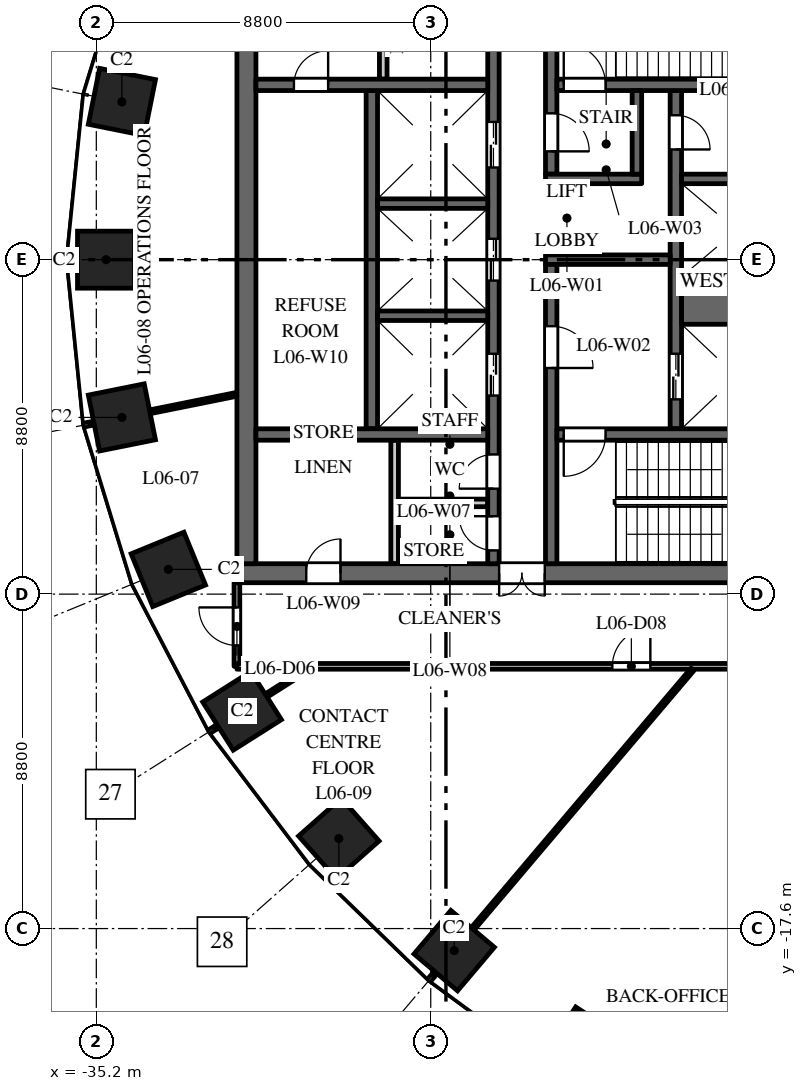
"""IFC4 building model, lengths in metres.
Left out: names, types, materials, properties, quantities, classifications, styles, units other than length and angle.
Written with IfcOpenShell. Run it as: python <this file> out.ifc"""

import sys

from ifc_helpers import new_model, si_unit, direction, frame, frame_2d, origin, origin_2d, place, context, subcontext, project, spatial, rectangle, extrude, element, fill, save


model = new_model("IFC4")
c1 = context("Model", 3, precision=1e-05, world=origin(), true_north=direction((0.0, 1.0)))
c2 = subcontext(c1, "Body", "Model", "MODEL_VIEW")
j1 = project(units=[si_unit("LENGTHUNIT", "METRE"), si_unit("PLANEANGLEUNIT", "RADIAN")], contexts=[c1])
p1 = place(None, origin())
s1 = spatial("IfcSite", under=j1, at=p1, CompositionType="ELEMENT")
p2 = place(p1, origin())
s2 = spatial("IfcBuilding", under=s1, at=p2, CompositionType="ELEMENT")
p3 = place(p2, frame((0.0, 0.0, 34.5)))
s3 = spatial("IfcBuildingStorey", under=s2, at=p3, CompositionType="ELEMENT", Elevation=34.5)
for number, where, z_axis, x_axis in (
    (1, (-34.527, 4.151, 0.0), (0.0, 0.0, 1.0), (-0.197, -0.98, 0.0)),
    (2, (-34.945, 0.0, 0.0), (0.0, 0.0, 1.0), (0.0, -1.0, 0.0)),
    (3, (-34.527, -4.151, 0.0), (0.0, 0.0, 1.0), (0.197, -0.98, 0.0)),
    (4, (-33.305, -8.149, 0.0), (0.0, 0.0, 1.0), (0.379, -0.925, 0.0)),
    (5, (-31.365, -11.871, 0.0), (0.0, 0.0, 1.0), (0.535, -0.845, 0.0)),
    (6, (-28.819, -15.23, 0.0), (0.0, 0.0, 1.0), (0.663, -0.749, 0.0)),
    (7, (-25.783, -18.18, 0.0), (0.0, 0.0, 1.0), (0.763, -0.646, 0.0)),
    (8, (-22.362, -20.7, 0.0), (0.0, 0.0, 1.0), (0.84, -0.542, 0.0)),
):
    element("IfcColumn", number, at=place(p3, frame(where, z_axis=z_axis, x_axis=x_axis)), inside=s3, PredefinedType="COLUMN", context=c2, shape_type="SweptSolid", body=[
        extrude(rectangle(XDim=1.5, YDim=1.5, at=origin_2d()), origin(), (0.0, 0.0, 1.0), 4.0),
    ])
p4 = place(p3, frame((-16.5, -8.25, 0.0), z_axis=(0.0, 0.0, 1.0), x_axis=(-1.0, 0.0, 0.0)))
e9 = element("IfcWall", 9, at=p4, inside=s3, PredefinedType="SHEAR", context=c2, shape_type="SweptSolid", body=[
    extrude(rectangle(XDim=15.0, YDim=0.5, at=frame_2d((7.5, 0.0))), origin(), (0.0, 0.0, 1.0), 3.7),
])
p5 = place(p4, frame((6.9, 0.0, 0.0)))
e10 = element("IfcOpeningElement", 10, at=p5, cuts=e9, PredefinedType="OPENING", context=c2, shape_type="SweptSolid", body=[
    extrude(rectangle(XDim=1.2, YDim=2.1, at=frame_2d((0.6, 1.05))), frame((0.0, 0.26, 0.0), z_axis=(0.0, -1.0, 0.0), x_axis=(1.0, 0.0, 0.0)), (0.0, 0.0, 1.0), 0.52),
])
p6 = place(p4, frame((12.275, 0.0, 0.0)))
e11 = element("IfcOpeningElement", 11, at=p6, cuts=e9, PredefinedType="OPENING", context=c2, shape_type="SweptSolid", body=[
    extrude(rectangle(XDim=0.9, YDim=2.1, at=frame_2d((0.45, 1.05))), frame((0.0, 0.26, 0.0), z_axis=(0.0, -1.0, 0.0), x_axis=(1.0, 0.0, 0.0)), (0.0, 0.0, 1.0), 0.52),
])
p7 = place(p3, frame((-27.95, -4.45, 0.0), z_axis=(0.0, 0.0, 1.0), x_axis=(0.0, 1.0, 0.0)))
e12 = element("IfcWall", 12, at=p7, inside=s3, PredefinedType="SHEAR", context=c2, shape_type="SweptSolid", body=[
    extrude(rectangle(XDim=8.9, YDim=0.3, at=frame_2d((4.45, 0.0))), origin(), (0.0, 0.0, 1.0), 3.7),
])
p8 = place(p3, frame((-19.95, -4.45, 0.0), z_axis=(0.0, 0.0, 1.0), x_axis=(0.0, 1.0, 0.0)))
e13 = element("IfcWall", 13, at=p8, inside=s3, PredefinedType="SHEAR", context=c2, shape_type="SweptSolid", body=[
    extrude(rectangle(XDim=8.9, YDim=0.3, at=frame_2d((4.45, 0.0))), origin(), (0.0, 0.0, 1.0), 3.7),
])
p9 = place(p8, frame((0.775, 0.0, 0.0)))
e14 = element("IfcOpeningElement", 14, at=p9, cuts=e13, PredefinedType="OPENING", context=c2, shape_type="SweptSolid", body=[
    extrude(rectangle(XDim=1.2, YDim=2.1, at=frame_2d((0.6, 1.05))), frame((0.0, 0.16, 0.0), z_axis=(0.0, -1.0, 0.0), x_axis=(1.0, 0.0, 0.0)), (0.0, 0.0, 1.0), 0.32),
])
p10 = place(p8, frame((7.35, 0.0, 0.0)))
e15 = element("IfcOpeningElement", 15, at=p10, cuts=e13, PredefinedType="OPENING", context=c2, shape_type="SweptSolid", body=[
    extrude(rectangle(XDim=0.9, YDim=2.1, at=frame_2d((0.45, 1.05))), frame((0.0, 0.16, 0.0), z_axis=(0.0, -1.0, 0.0), x_axis=(1.0, 0.0, 0.0)), (0.0, 0.0, 1.0), 0.32),
])
p11 = place(p3, frame((-24.75, -8.0, 0.0), z_axis=(0.0, 0.0, 1.0), x_axis=(0.0, 1.0, 0.0)))
e16 = element("IfcWall", 16, at=p11, inside=s3, PredefinedType="SHEAR", context=c2, shape_type="SweptSolid", body=[
    extrude(rectangle(XDim=16.0, YDim=0.3, at=frame_2d((8.0, 0.0))), origin(), (0.0, 0.0, 1.0), 3.7),
])
p12 = place(p11, frame((4.425, 0.0, 0.0)))
e17 = element("IfcOpeningElement", 17, at=p12, cuts=e16, PredefinedType="OPENING", context=c2, shape_type="SweptSolid", body=[
    extrude(rectangle(XDim=1.1, YDim=2.1, at=frame_2d((0.55, 1.05))), frame((0.0, 0.16, 0.0), z_axis=(0.0, -1.0, 0.0), x_axis=(1.0, 0.0, 0.0)), (0.0, 0.0, 1.0), 0.32),
])
p13 = place(p11, frame((7.45, 0.0, 0.0)))
e18 = element("IfcOpeningElement", 18, at=p13, cuts=e16, PredefinedType="OPENING", context=c2, shape_type="SweptSolid", body=[
    extrude(rectangle(XDim=1.1, YDim=2.1, at=frame_2d((0.55, 1.05))), frame((0.0, 0.16, 0.0), z_axis=(0.0, -1.0, 0.0), x_axis=(1.0, 0.0, 0.0)), (0.0, 0.0, 1.0), 0.32),
])
p14 = place(p11, frame((10.425, 0.0, 0.0)))
e19 = element("IfcOpeningElement", 19, at=p14, cuts=e16, PredefinedType="OPENING", context=c2, shape_type="SweptSolid", body=[
    extrude(rectangle(XDim=1.2, YDim=2.1, at=frame_2d((0.6, 1.05))), frame((0.0, 0.16, 0.0), z_axis=(0.0, -1.0, 0.0), x_axis=(1.0, 0.0, 0.0)), (0.0, 0.0, 1.0), 0.32),
])
p15 = place(p11, frame((13.75, 0.0, 0.0)))
e20 = element("IfcOpeningElement", 20, at=p15, cuts=e16, PredefinedType="OPENING", context=c2, shape_type="SweptSolid", body=[
    extrude(rectangle(XDim=0.9, YDim=2.1, at=frame_2d((0.45, 1.05))), frame((0.0, 0.16, 0.0), z_axis=(0.0, -1.0, 0.0), x_axis=(1.0, 0.0, 0.0)), (0.0, 0.0, 1.0), 0.32),
])
p16 = place(p11, frame((1.975, 0.0, 0.0)))
e21 = element("IfcOpeningElement", 21, at=p16, cuts=e16, PredefinedType="OPENING", context=c2, shape_type="SweptSolid", body=[
    extrude(rectangle(XDim=0.9, YDim=2.1, at=frame_2d((0.45, 1.05))), frame((0.0, 0.16, 0.0), z_axis=(0.0, -1.0, 0.0), x_axis=(1.0, 0.0, 0.0)), (0.0, 0.0, 1.0), 0.32),
])
p17 = place(p11, frame((0.35, 0.0, 0.0)))
e22 = element("IfcOpeningElement", 22, at=p17, cuts=e16, PredefinedType="OPENING", context=c2, shape_type="SweptSolid", body=[
    extrude(rectangle(XDim=0.9, YDim=2.1, at=frame_2d((0.45, 1.05))), frame((0.0, 0.16, 0.0), z_axis=(0.0, -1.0, 0.0), x_axis=(1.0, 0.0, 0.0)), (0.0, 0.0, 1.0), 0.32),
])
p18 = place(p3, frame((-20.1, 0.0, 0.0), z_axis=(0.0, 0.0, 1.0), x_axis=(-1.0, 0.0, 0.0)))
e23 = element("IfcWall", 23, at=p18, inside=s3, PredefinedType="SHEAR", context=c2, shape_type="SweptSolid", body=[
    extrude(rectangle(XDim=3.28, YDim=0.25, at=frame_2d((1.64, 0.0))), origin(), (0.0, 0.0, 1.0), 3.7),
])
p19 = place(p3, frame((-31.25, -8.0, 0.0), z_axis=(0.0, 0.0, 1.0), x_axis=(0.0, 1.0, 0.0)))
e24 = element("IfcWall", 24, at=p19, inside=s3, PredefinedType="SHEAR", context=c2, shape_type="SweptSolid", body=[
    extrude(rectangle(XDim=16.0, YDim=0.5, at=frame_2d((8.0, 0.0))), origin(), (0.0, 0.0, 1.0), 3.7),
])
p20 = place(p3, frame((-24.9, 4.6, 0.0), z_axis=(0.0, 0.0, 1.0), x_axis=(-1.0, 0.0, 0.0)))
e25 = element("IfcWall", 25, at=p20, inside=s3, PredefinedType="SHEAR", context=c2, shape_type="SweptSolid", body=[
    extrude(rectangle(XDim=6.1, YDim=0.3, at=frame_2d((3.05, 0.0))), origin(), (0.0, 0.0, 1.0), 3.7),
])
p21 = place(p20, frame((4.2, 0.0, 0.0)))
e26 = element("IfcOpeningElement", 26, at=p21, cuts=e25, PredefinedType="OPENING", context=c2, shape_type="SweptSolid", body=[
    extrude(rectangle(XDim=0.9, YDim=2.1, at=frame_2d((0.45, 1.05))), frame((0.0, 0.16, 0.0), z_axis=(0.0, -1.0, 0.0), x_axis=(1.0, 0.0, 0.0)), (0.0, 0.0, 1.0), 0.32),
])
for number, where, z_axis, x_axis in (
    (27, (-27.65, 4.75, 0.0), (0.0, 0.0, 1.0), (0.0, 1.0, 0.0)),
    (28, (-27.35, -8.0, 0.0), (0.0, 0.0, 1.0), (0.0, 1.0, 0.0)),
):
    element("IfcWall", number, at=place(p3, frame(where, z_axis=z_axis, x_axis=x_axis)), inside=s3, PredefinedType="PARTITIONING", context=c2, shape_type="SweptSolid", body=[
        extrude(rectangle(XDim=3.25, YDim=0.2, at=frame_2d((1.625, 0.0))), origin(), (0.0, 0.0, 1.0), 3.7),
    ])
p22 = place(p3, frame((-24.9, -6.4, 0.0), z_axis=(0.0, 0.0, 1.0), x_axis=(-1.0, 0.0, 0.0)))
e29 = element("IfcWall", 29, at=p22, inside=s3, PredefinedType="PARTITIONING", context=c2, shape_type="SweptSolid", body=[
    extrude(rectangle(XDim=2.35, YDim=0.2, at=frame_2d((1.175, 0.0))), origin(), (0.0, 0.0, 1.0), 3.7),
])
p23 = place(p3, frame((-24.9, -4.6, 0.0), z_axis=(0.0, 0.0, 1.0), x_axis=(-1.0, 0.0, 0.0)))
e30 = element("IfcWall", 30, at=p23, inside=s3, PredefinedType="SHEAR", context=c2, shape_type="SweptSolid", body=[
    extrude(rectangle(XDim=6.1, YDim=0.3, at=frame_2d((3.05, 0.0))), origin(), (0.0, 0.0, 1.0), 3.7),
])
p24 = place(p3, frame((-16.9, -1.075, 0.0), z_axis=(0.0, 0.0, 1.0), x_axis=(-1.0, 0.0, 0.0)))
e31 = element("IfcWall", 31, at=p24, inside=s3, PredefinedType="SHEAR", context=c2, shape_type="SweptSolid", body=[
    extrude(rectangle(XDim=2.9, YDim=1.25, at=frame_2d((1.45, 0.0))), origin(), (0.0, 0.0, 1.0), 3.7),
])
for number, where, z_axis, x_axis in (
    (32, (-16.9, 2.125, 0.0), (0.0, 0.0, 1.0), (-1.0, 0.0, 0.0)),
    (33, (-24.9, -1.475, 0.0), (0.0, 0.0, 1.0), (-1.0, 0.0, 0.0)),
    (34, (-24.9, 1.475, 0.0), (0.0, 0.0, 1.0), (-1.0, 0.0, 0.0)),
):
    element("IfcWall", number, at=place(p3, frame(where, z_axis=z_axis, x_axis=x_axis)), inside=s3, PredefinedType="SHEAR", context=c2, shape_type="SweptSolid", body=[
        extrude(rectangle(XDim=2.9, YDim=0.25, at=frame_2d((1.45, 0.0))), origin(), (0.0, 0.0, 1.0), 3.7),
    ])
p25 = place(p3, frame((-23.23, 2.25, 0.0), z_axis=(0.0, 0.0, 1.0), x_axis=(0.0, 1.0, 0.0)))
e35 = element("IfcWall", 35, at=p25, inside=s3, PredefinedType="SHEAR", context=c2, shape_type="SweptSolid", body=[
    extrude(rectangle(XDim=5.75, YDim=0.3, at=frame_2d((2.875, 0.0))), origin(), (0.0, 0.0, 1.0), 3.7),
])
p26 = place(p25, frame((0.6, 0.0, 0.0)))
e36 = element("IfcOpeningElement", 36, at=p26, cuts=e35, PredefinedType="OPENING", context=c2, shape_type="SweptSolid", body=[
    extrude(rectangle(XDim=1.0, YDim=2.1, at=frame_2d((0.5, 1.05))), frame((0.0, 0.16, 0.0), z_axis=(0.0, -1.0, 0.0), x_axis=(1.0, 0.0, 0.0)), (0.0, 0.0, 1.0), 0.32),
])
p27 = place(p3, frame((-23.23, -8.0, 0.0), z_axis=(0.0, 0.0, 1.0), x_axis=(0.0, 1.0, 0.0)))
e37 = element("IfcWall", 37, at=p27, inside=s3, PredefinedType="SHEAR", context=c2, shape_type="SweptSolid", body=[
    extrude(rectangle(XDim=7.875, YDim=0.3, at=frame_2d((3.938, 0.0))), origin(), (0.0, 0.0, 1.0), 3.7),
])
p28 = place(p27, frame((5.15, 0.0, 0.0)))
e38 = element("IfcOpeningElement", 38, at=p28, cuts=e37, PredefinedType="OPENING", context=c2, shape_type="SweptSolid", body=[
    extrude(rectangle(XDim=1.1, YDim=2.1, at=frame_2d((0.55, 1.05))), frame((0.0, 0.16, 0.0), z_axis=(0.0, -1.0, 0.0), x_axis=(1.0, 0.0, 0.0)), (0.0, 0.0, 1.0), 0.32),
])
p29 = place(p3, frame((-16.9, 4.6, 0.0), z_axis=(0.0, 0.0, 1.0), x_axis=(-1.0, 0.0, 0.0)))
e39 = element("IfcWall", 39, at=p29, inside=s3, PredefinedType="SHEAR", context=c2, shape_type="SweptSolid", body=[
    extrude(rectangle(XDim=6.18, YDim=0.3, at=frame_2d((3.09, 0.0))), origin(), (0.0, 0.0, 1.0), 3.7),
])
p30 = place(p29, frame((4.9, 0.0, 0.0)))
e40 = element("IfcOpeningElement", 40, at=p30, cuts=e39, PredefinedType="OPENING", context=c2, shape_type="SweptSolid", body=[
    extrude(rectangle(XDim=1.1, YDim=2.1, at=frame_2d((0.55, 1.05))), frame((0.0, 0.16, 0.0), z_axis=(0.0, -1.0, 0.0), x_axis=(1.0, 0.0, 0.0)), (0.0, 0.0, 1.0), 0.32),
])
p31 = place(p3, frame((-16.9, -4.6, 0.0), z_axis=(0.0, 0.0, 1.0), x_axis=(-1.0, 0.0, 0.0)))
e41 = element("IfcWall", 41, at=p31, inside=s3, PredefinedType="SHEAR", context=c2, shape_type="SweptSolid", body=[
    extrude(rectangle(XDim=6.18, YDim=0.3, at=frame_2d((3.09, 0.0))), origin(), (0.0, 0.0, 1.0), 3.7),
])
p32 = place(p31, frame((4.9, 0.0, 0.0)))
e42 = element("IfcOpeningElement", 42, at=p32, cuts=e41, PredefinedType="OPENING", context=c2, shape_type="SweptSolid", body=[
    extrude(rectangle(XDim=1.1, YDim=2.1, at=frame_2d((0.55, 1.05))), frame((0.0, 0.16, 0.0), z_axis=(0.0, -1.0, 0.0), x_axis=(1.0, 0.0, 0.0)), (0.0, 0.0, 1.0), 0.32),
])
p33 = place(p3, frame((-20.85, 2.125, 0.0), z_axis=(0.0, 0.0, 1.0), x_axis=(-1.0, 0.0, 0.0)))
e43 = element("IfcWall", 43, at=p33, inside=s3, PredefinedType="SHEAR", context=c2, shape_type="SweptSolid", body=[
    extrude(rectangle(XDim=2.53, YDim=0.25, at=frame_2d((1.265, 0.0))), origin(), (0.0, 0.0, 1.0), 3.7),
])
p34 = place(p3, frame((-20.975, 2.25, 0.0), z_axis=(0.0, 0.0, 1.0), x_axis=(0.0, 1.0, 0.0)))
e44 = element("IfcWall", 44, at=p34, inside=s3, PredefinedType="SHEAR", context=c2, shape_type="SweptSolid", body=[
    extrude(rectangle(XDim=2.2, YDim=0.25, at=frame_2d((1.1, 0.0))), origin(), (0.0, 0.0, 1.0), 3.7),
])
p35 = place(p3, frame((-35.512, -4.349, 0.0), z_axis=(0.0, 0.0, 1.0), x_axis=(0.980357474535, 0.197228857227, 0.0)))
e45 = element("IfcWall", 45, at=p35, inside=s3, PredefinedType="PARTITIONING", context=c2, shape_type="SweptSolid", body=[
    extrude(rectangle(XDim=4.092, YDim=0.1, at=frame_2d((2.046, 0.0))), origin(), (0.0, 0.0, 1.0), 3.2),
])
p36 = place(p3, frame((-32.212, -12.408, 0.0), z_axis=(0.0, 0.0, 1.0), x_axis=(0.844810627195, 0.535065420467, 0.0)))
e46 = element("IfcWall", 46, at=p36, inside=s3, PredefinedType="PARTITIONING", context=c2, shape_type="SweptSolid", body=[
    extrude(rectangle(XDim=3.048, YDim=0.1, at=frame_2d((1.524, 0.0))), origin(), (0.0, 0.0, 1.0), 3.7),
])
p37 = place(p3, frame((-31.5, -10.7, 0.0), z_axis=(0.0, 0.0, 1.0), x_axis=(0.0, 1.0, 0.0)))
e47 = element("IfcWall", 47, at=p37, inside=s3, PredefinedType="PARTITIONING", context=c2, shape_type="SweptSolid", body=[
    extrude(rectangle(XDim=2.2, YDim=0.15, at=frame_2d((1.1, 0.0))), origin(), (0.0, 0.0, 1.0), 3.7),
])
p38 = place(p37, frame((0.55, 0.0, 0.0)))
e48 = element("IfcOpeningElement", 48, at=p38, cuts=e47, PredefinedType="OPENING", context=c2, shape_type="SweptSolid", body=[
    extrude(rectangle(XDim=1.0, YDim=2.1, at=frame_2d((0.5, 1.05))), frame((0.0, 0.085, 0.0), z_axis=(0.0, -1.0, 0.0), x_axis=(1.0, 0.0, 0.0)), (0.0, 0.0, 1.0), 0.17),
])
p39 = place(p3, frame((-31.5, -10.7, 0.0), z_axis=(0.0, 0.0, 1.0), x_axis=(1.0, 0.0, 0.0)))
e49 = element("IfcWall", 49, at=p39, inside=s3, PredefinedType="PARTITIONING", context=c2, shape_type="SweptSolid", body=[
    extrude(rectangle(XDim=15.0, YDim=0.15, at=frame_2d((7.5, 0.0))), origin(), (0.0, 0.0, 1.0), 3.1),
])
p40 = place(p39, frame((9.879, 0.0, 0.0)))
e50 = element("IfcOpeningElement", 50, at=p40, cuts=e49, PredefinedType="OPENING", context=c2, shape_type="SweptSolid", body=[
    extrude(rectangle(XDim=1.0, YDim=2.1, at=frame_2d((0.5, 1.05))), frame((0.0, 0.085, 0.0), z_axis=(0.0, -1.0, 0.0), x_axis=(1.0, 0.0, 0.0)), (0.0, 0.0, 1.0), 0.17),
])
p41 = place(p39, frame((13.449, 0.0, 0.0)))
e51 = element("IfcOpeningElement", 51, at=p41, cuts=e49, PredefinedType="OPENING", context=c2, shape_type="SweptSolid", body=[
    extrude(rectangle(XDim=1.0, YDim=2.1, at=frame_2d((0.5, 1.05))), frame((0.0, 0.085, 0.0), z_axis=(0.0, -1.0, 0.0), x_axis=(1.0, 0.0, 0.0)), (0.0, 0.0, 1.0), 0.17),
])
p42 = place(p3, frame((-26.43, -18.945, 0.0), z_axis=(0.0, 0.0, 1.0), x_axis=(0.646400187952, 0.762998556365, 0.0)))
e52 = element("IfcWall", 52, at=p42, inside=s3, PredefinedType="PARTITIONING", context=c2, shape_type="SweptSolid", body=[
    extrude(rectangle(XDim=10.704, YDim=0.1, at=frame_2d((5.352, 0.0))), origin(), (0.0, 0.0, 1.0), 3.7),
])
p43 = place(p3, frame((-19.086, -23.685, 0.0), z_axis=(0.0, 0.0, 1.0), x_axis=(0.439199750603, 0.898389436197, 0.0)))
e53 = element("IfcWall", 53, at=p43, inside=s3, PredefinedType="PARTITIONING", context=c2, shape_type="SweptSolid", body=[
    extrude(rectangle(XDim=11.81, YDim=0.1, at=frame_2d((5.905, 0.0))), origin(), (0.0, 0.0, 1.0), 3.7),
])
p44 = place(p9, origin())
e54 = element("IfcDoor", 54, at=p44, inside=s3, OperationType="DOUBLE_DOOR_SLIDING", PredefinedType="DOOR", context=c2, shape_type="SweptSolid", body=[
    extrude(rectangle(XDim=1.2, YDim=2.1, at=frame_2d((0.6, 1.05))), frame((0.0, 0.025, 0.0), z_axis=(0.0, -1.0, 0.0), x_axis=(1.0, 0.0, 0.0)), (0.0, 0.0, 1.0), 0.05),
])
fill(e14, e54)
p45 = place(p12, origin())
e55 = element("IfcDoor", 55, at=p45, inside=s3, OperationType="DOUBLE_DOOR_SLIDING", PredefinedType="DOOR", context=c2, shape_type="SweptSolid", body=[
    extrude(rectangle(XDim=1.1, YDim=2.1, at=frame_2d((0.55, 1.05))), frame((0.0, 0.025, 0.0), z_axis=(0.0, -1.0, 0.0), x_axis=(1.0, 0.0, 0.0)), (0.0, 0.0, 1.0), 0.05),
])
fill(e17, e55)
p46 = place(p13, origin())
e56 = element("IfcDoor", 56, at=p46, inside=s3, OperationType="DOUBLE_DOOR_SLIDING", PredefinedType="DOOR", context=c2, shape_type="SweptSolid", body=[
    extrude(rectangle(XDim=1.1, YDim=2.1, at=frame_2d((0.55, 1.05))), frame((0.0, 0.025, 0.0), z_axis=(0.0, -1.0, 0.0), x_axis=(1.0, 0.0, 0.0)), (0.0, 0.0, 1.0), 0.05),
])
fill(e18, e56)
p47 = place(p14, origin())
e57 = element("IfcDoor", 57, at=p47, inside=s3, OperationType="DOUBLE_DOOR_SLIDING", PredefinedType="DOOR", context=c2, shape_type="SweptSolid", body=[
    extrude(rectangle(XDim=1.2, YDim=2.1, at=frame_2d((0.6, 1.05))), frame((0.0, 0.025, 0.0), z_axis=(0.0, -1.0, 0.0), x_axis=(1.0, 0.0, 0.0)), (0.0, 0.0, 1.0), 0.05),
])
fill(e19, e57)
p48 = place(p30, origin())
e58 = element("IfcDoor", 58, at=p48, inside=s3, OperationType="SINGLE_SWING_RIGHT", PredefinedType="DOOR", context=c2, shape_type="SweptSolid", body=[
    extrude(rectangle(XDim=1.1, YDim=2.1, at=frame_2d((0.55, 1.05))), frame((0.0, 0.025, 0.0), z_axis=(0.0, -1.0, 0.0), x_axis=(1.0, 0.0, 0.0)), (0.0, 0.0, 1.0), 0.05),
])
fill(e40, e58)
p49 = place(p32, origin())
e59 = element("IfcDoor", 59, at=p49, inside=s3, OperationType="SINGLE_SWING_LEFT", PredefinedType="DOOR", context=c2, shape_type="SweptSolid", body=[
    extrude(rectangle(XDim=1.1, YDim=2.1, at=frame_2d((0.55, 1.05))), frame((0.0, 0.025, 0.0), z_axis=(0.0, -1.0, 0.0), x_axis=(1.0, 0.0, 0.0)), (0.0, 0.0, 1.0), 0.05),
])
fill(e42, e59)
p50 = place(p28, origin())
e60 = element("IfcDoor", 60, at=p50, inside=s3, OperationType="SINGLE_SWING_LEFT", PredefinedType="DOOR", context=c2, shape_type="SweptSolid", body=[
    extrude(rectangle(XDim=1.1, YDim=2.1, at=frame_2d((0.55, 1.05))), frame((0.0, 0.025, 0.0), z_axis=(0.0, -1.0, 0.0), x_axis=(1.0, 0.0, 0.0)), (0.0, 0.0, 1.0), 0.05),
])
fill(e38, e60)
p51 = place(p26, origin())
e61 = element("IfcDoor", 61, at=p51, inside=s3, OperationType="SINGLE_SWING_LEFT", PredefinedType="DOOR", context=c2, shape_type="SweptSolid", body=[
    extrude(rectangle(XDim=1.0, YDim=2.1, at=frame_2d((0.5, 1.05))), frame((0.0, 0.025, 0.0), z_axis=(0.0, -1.0, 0.0), x_axis=(1.0, 0.0, 0.0)), (0.0, 0.0, 1.0), 0.05),
])
fill(e36, e61)
p52 = place(p5, origin())
e62 = element("IfcDoor", 62, at=p52, inside=s3, OperationType="DOUBLE_DOOR_DOUBLE_SWING", PredefinedType="DOOR", context=c2, shape_type="SweptSolid", body=[
    extrude(rectangle(XDim=1.2, YDim=2.1, at=frame_2d((0.6, 1.05))), frame((0.0, 0.025, 0.0), z_axis=(0.0, -1.0, 0.0), x_axis=(1.0, 0.0, 0.0)), (0.0, 0.0, 1.0), 0.05),
])
fill(e10, e62)
p53 = place(p10, origin())
e63 = element("IfcDoor", 63, at=p53, inside=s3, OperationType="SINGLE_SWING_LEFT", PredefinedType="DOOR", context=c2, shape_type="SweptSolid", body=[
    extrude(rectangle(XDim=0.9, YDim=2.1, at=frame_2d((0.45, 1.05))), frame((0.0, 0.025, 0.0), z_axis=(0.0, -1.0, 0.0), x_axis=(1.0, 0.0, 0.0)), (0.0, 0.0, 1.0), 0.05),
])
fill(e15, e63)
p54 = place(p16, origin())
e64 = element("IfcDoor", 64, at=p54, inside=s3, OperationType="SINGLE_SWING_RIGHT", PredefinedType="DOOR", context=c2, shape_type="SweptSolid", body=[
    extrude(rectangle(XDim=0.9, YDim=2.1, at=frame_2d((0.45, 1.05))), frame((0.0, 0.025, 0.0), z_axis=(0.0, -1.0, 0.0), x_axis=(1.0, 0.0, 0.0)), (0.0, 0.0, 1.0), 0.05),
])
fill(e21, e64)
p55 = place(p17, origin())
e65 = element("IfcDoor", 65, at=p55, inside=s3, OperationType="SINGLE_SWING_LEFT", PredefinedType="DOOR", context=c2, shape_type="SweptSolid", body=[
    extrude(rectangle(XDim=0.9, YDim=2.1, at=frame_2d((0.45, 1.05))), frame((0.0, 0.025, 0.0), z_axis=(0.0, -1.0, 0.0), x_axis=(1.0, 0.0, 0.0)), (0.0, 0.0, 1.0), 0.05),
])
fill(e22, e65)
p56 = place(p6, origin())
e66 = element("IfcDoor", 66, at=p56, inside=s3, OperationType="SINGLE_SWING_LEFT", PredefinedType="DOOR", context=c2, shape_type="SweptSolid", body=[
    extrude(rectangle(XDim=0.9, YDim=2.1, at=frame_2d((0.45, 1.05))), frame((0.0, 0.025, 0.0), z_axis=(0.0, -1.0, 0.0), x_axis=(1.0, 0.0, 0.0)), (0.0, 0.0, 1.0), 0.05),
])
fill(e11, e66)
p57 = place(p21, origin())
e67 = element("IfcDoor", 67, at=p57, inside=s3, OperationType="SINGLE_SWING_LEFT", PredefinedType="DOOR", context=c2, shape_type="SweptSolid", body=[
    extrude(rectangle(XDim=0.9, YDim=2.1, at=frame_2d((0.45, 1.05))), frame((0.0, 0.025, 0.0), z_axis=(0.0, -1.0, 0.0), x_axis=(1.0, 0.0, 0.0)), (0.0, 0.0, 1.0), 0.05),
])
fill(e26, e67)
p58 = place(p38, origin())
e68 = element("IfcDoor", 68, at=p58, inside=s3, OperationType="SINGLE_SWING_RIGHT", PredefinedType="DOOR", context=c2, shape_type="SweptSolid", body=[
    extrude(rectangle(XDim=1.0, YDim=2.1, at=frame_2d((0.5, 1.05))), frame((0.0, 0.025, 0.0), z_axis=(0.0, -1.0, 0.0), x_axis=(1.0, 0.0, 0.0)), (0.0, 0.0, 1.0), 0.05),
])
fill(e48, e68)
p59 = place(p40, origin())
e69 = element("IfcDoor", 69, at=p59, inside=s3, OperationType="SINGLE_SWING_RIGHT", PredefinedType="DOOR", context=c2, shape_type="SweptSolid", body=[
    extrude(rectangle(XDim=1.0, YDim=2.1, at=frame_2d((0.5, 1.05))), frame((0.0, 0.025, 0.0), z_axis=(0.0, -1.0, 0.0), x_axis=(1.0, 0.0, 0.0)), (0.0, 0.0, 1.0), 0.05),
])
fill(e50, e69)
save(model, sys.argv[1])
